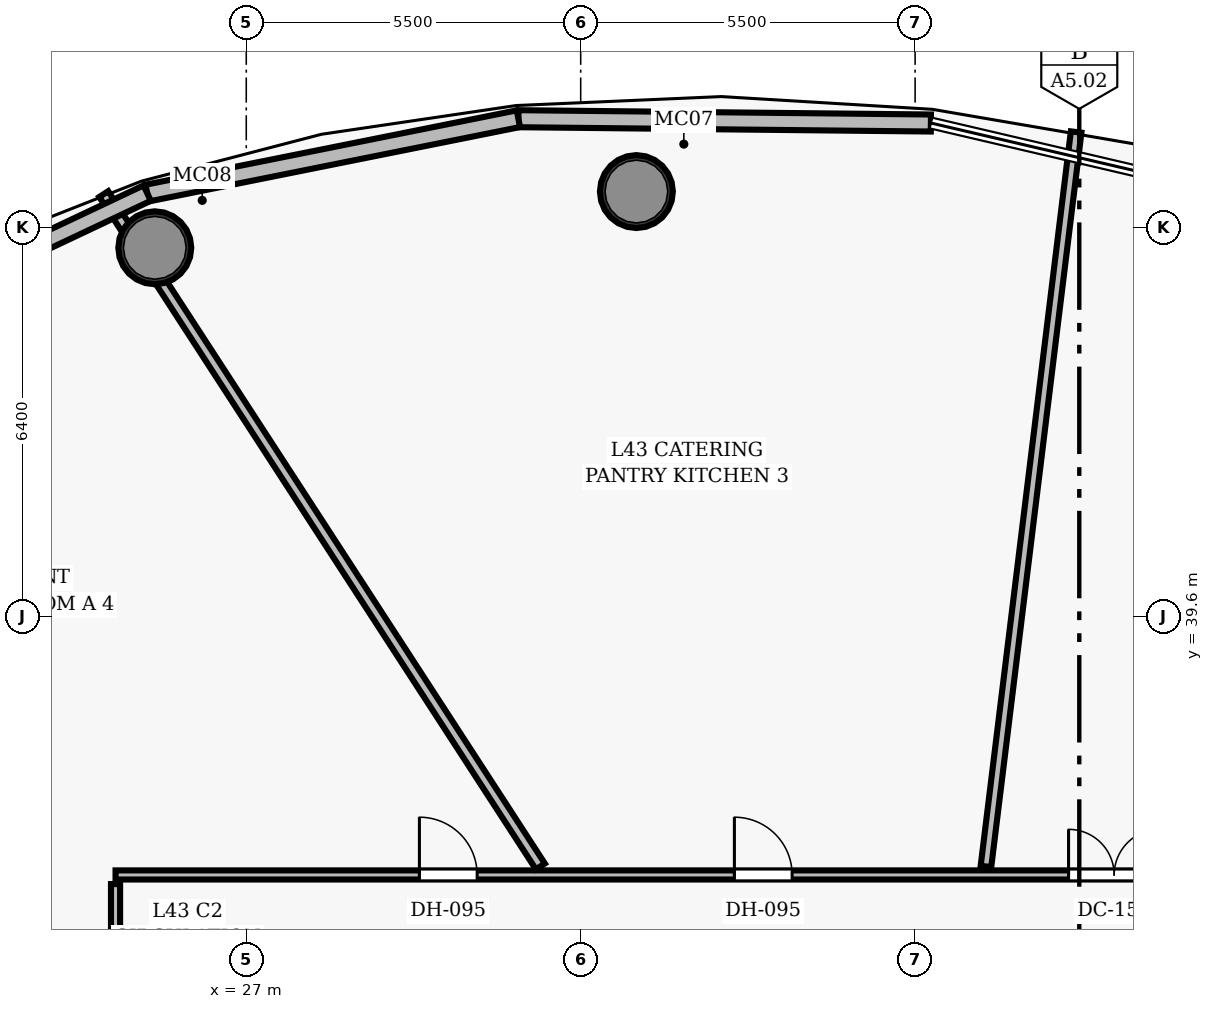
"""IFC4 building model, lengths in metres.
Left out: names, types, materials, properties, quantities, classifications, styles, units other than length and angle.
Written with IfcOpenShell. Run it as: python <this file> out.ifc"""

import sys

from ifc_helpers import new_model, si_unit, direction, frame, frame_2d, origin, origin_2d, place, context, subcontext, project, spatial, rectangle, hollow_circle, extrude, element, fill, save


model = new_model("IFC4")
c1 = context("Model", 3, precision=1e-05, world=origin(), true_north=direction((0.0, 1.0)))
c2 = subcontext(c1, "Body", "Model", "MODEL_VIEW")
j1 = project(units=[si_unit("LENGTHUNIT", "METRE"), si_unit("PLANEANGLEUNIT", "RADIAN")], contexts=[c1])
p1 = place(None, origin())
s1 = spatial("IfcSite", under=j1, at=p1, CompositionType="ELEMENT")
p2 = place(p1, origin())
s2 = spatial("IfcBuilding", under=s1, at=p2, CompositionType="ELEMENT")
p3 = place(p2, frame((0.0, 0.0, 171.2)))
s3 = spatial("IfcBuildingStorey", under=s2, at=p3, CompositionType="ELEMENT", Elevation=171.2)
for number, where, z_axis, x_axis in (
    (1, (33.416, 46.588, 0.0), (0.0, 0.0, 1.0), (1.0, 0.0, 0.0)),
    (2, (25.496, 45.664, 0.0), (0.0, 0.0, 1.0), (1.0, 0.0, 0.0)),
):
    element("IfcColumn", number, at=place(p3, frame(where, z_axis=z_axis, x_axis=x_axis)), inside=s3, PredefinedType="COLUMN", context=c2, shape_type="SweptSolid", body=[
        extrude(hollow_circle(Radius=0.6, WallThickness=0.05, at=origin_2d()), origin(), (0.0, 0.0, 1.0), 3.85),
    ])
p4 = place(p3, frame((24.85, 35.35, 0.0), z_axis=(0.0, 0.0, 1.0), x_axis=(1.0, 0.0, 0.0)))
e3 = element("IfcWall", 3, at=p4, inside=s3, PredefinedType="PARTITIONING", context=c2, shape_type="SweptSolid", body=[
    extrude(rectangle(XDim=26.0, YDim=0.15, at=frame_2d((13.0, 0.0))), origin(), (0.0, 0.0, 1.0), 3.035),
])
p5 = place(p4, frame((15.674, 0.0, 0.0)))
e4 = element("IfcOpeningElement", 4, at=p5, cuts=e3, PredefinedType="OPENING", context=c2, shape_type="SweptSolid", body=[
    extrude(rectangle(XDim=1.5, YDim=2.2, at=frame_2d((0.75, 1.1))), frame((0.0, 0.085, 0.0), z_axis=(0.0, -1.0, 0.0), x_axis=(1.0, 0.0, 0.0)), (0.0, 0.0, 1.0), 0.17),
])
p6 = place(p4, frame((10.178, 0.0, 0.0)))
e5 = element("IfcOpeningElement", 5, at=p6, cuts=e3, PredefinedType="OPENING", context=c2, shape_type="SweptSolid", body=[
    extrude(rectangle(XDim=0.95, YDim=2.15, at=frame_2d((0.475, 1.075))), frame((0.0, 0.085, 0.0), z_axis=(0.0, -1.0, 0.0), x_axis=(1.0, 0.0, 0.0)), (0.0, 0.0, 1.0), 0.17),
])
p7 = place(p4, frame((4.997, 0.0, 0.0)))
e6 = element("IfcOpeningElement", 6, at=p7, cuts=e3, PredefinedType="OPENING", context=c2, shape_type="SweptSolid", body=[
    extrude(rectangle(XDim=0.95, YDim=2.15, at=frame_2d((0.475, 1.075))), frame((0.0, 0.085, 0.0), z_axis=(0.0, -1.0, 0.0), x_axis=(1.0, 0.0, 0.0)), (0.0, 0.0, 1.0), 0.17),
])
p8 = place(p3, frame((24.85, 27.08, 0.0), z_axis=(0.0, 0.0, 1.0), x_axis=(0.0, 1.0, 0.0)))
e7 = element("IfcWall", 7, at=p8, inside=s3, PredefinedType="PARTITIONING", context=c2, shape_type="SweptSolid", body=[
    extrude(rectangle(XDim=8.12, YDim=0.15, at=frame_2d((4.06, 0.0))), origin(), (0.0, 0.0, 1.0), 3.035),
])
p9 = place(p3, frame((39.165, 35.49, 0.0), z_axis=(0.0, 0.0, 1.0), x_axis=(0.121866334527, 0.99254652108, 0.0)))
e8 = element("IfcWall", 8, at=p9, inside=s3, PredefinedType="PARTITIONING", context=c2, shape_type="SweptSolid", body=[
    extrude(rectangle(XDim=12.168, YDim=0.175, at=frame_2d((6.084, 0.0))), origin(), (0.0, 0.0, 1.0), 3.035),
])
p10 = place(p3, frame((31.837, 35.49, 0.0), z_axis=(0.0, 0.0, 1.0), x_axis=(-0.544634876215, 0.838673268687, 0.0)))
e9 = element("IfcWall", 9, at=p10, inside=s3, PredefinedType="PARTITIONING", context=c2, shape_type="SweptSolid", body=[
    extrude(rectangle(XDim=13.184, YDim=0.175, at=frame_2d((6.592, 0.0))), origin(), (0.0, 0.0, 1.0), 3.035),
])
p11 = place(p3, frame((31.475, 47.787, 0.0), z_axis=(0.0, 0.0, 1.0), x_axis=(0.999945547735, -0.010435591221, 0.0)))
e10 = element("IfcWall", 10, at=p11, inside=s3, PredefinedType="SOLIDWALL", context=c2, shape_type="SweptSolid", body=[
    extrude(rectangle(XDim=6.785, YDim=0.28, at=frame_2d((3.392, 0.0))), origin(), (0.0, 0.0, 1.0), 3.62),
])
p12 = place(p3, frame((25.37, 46.563, 0.0), z_axis=(0.0, 0.0, 1.0), x_axis=(0.980506708693, 0.196485608144, 0.0)))
e11 = element("IfcWall", 11, at=p12, inside=s3, PredefinedType="SOLIDWALL", context=c2, shape_type="SweptSolid", body=[
    extrude(rectangle(XDim=6.226, YDim=0.28, at=frame_2d((3.113, 0.0))), origin(), (0.0, 0.0, 1.0), 3.62),
])
p13 = place(p3, frame((20.43, 44.229, 0.0), z_axis=(0.0, 0.0, 1.0), x_axis=(0.904134088176, 0.427248815794, 0.0)))
e12 = element("IfcWall", 12, at=p13, inside=s3, PredefinedType="SOLIDWALL", context=c2, shape_type="SweptSolid", body=[
    extrude(rectangle(XDim=5.465, YDim=0.28, at=frame_2d((2.732, 0.0))), origin(), (0.0, 0.0, 1.0), 3.62),
])
p14 = place(p5, origin())
e13 = element("IfcDoor", 13, at=p14, inside=s3, OperationType="DOUBLE_DOOR_SINGLE_SWING", PredefinedType="DOOR", context=c2, shape_type="SweptSolid", body=[
    extrude(rectangle(XDim=1.5, YDim=2.2, at=frame_2d((0.75, 1.1))), frame((0.0, 0.025, 0.0), z_axis=(0.0, -1.0, 0.0), x_axis=(1.0, 0.0, 0.0)), (0.0, 0.0, 1.0), 0.05),
])
fill(e4, e13)
p15 = place(p6, origin())
e14 = element("IfcDoor", 14, at=p15, inside=s3, OperationType="SINGLE_SWING_LEFT", PredefinedType="DOOR", context=c2, shape_type="SweptSolid", body=[
    extrude(rectangle(XDim=0.95, YDim=2.15, at=frame_2d((0.475, 1.075))), frame((0.0, 0.025, 0.0), z_axis=(0.0, -1.0, 0.0), x_axis=(1.0, 0.0, 0.0)), (0.0, 0.0, 1.0), 0.05),
])
fill(e5, e14)
p16 = place(p7, origin())
e15 = element("IfcDoor", 15, at=p16, inside=s3, OperationType="SINGLE_SWING_LEFT", PredefinedType="DOOR", context=c2, shape_type="SweptSolid", body=[
    extrude(rectangle(XDim=0.95, YDim=2.15, at=frame_2d((0.475, 1.075))), frame((0.0, 0.025, 0.0), z_axis=(0.0, -1.0, 0.0), x_axis=(1.0, 0.0, 0.0)), (0.0, 0.0, 1.0), 0.05),
])
fill(e6, e15)
save(model, sys.argv[1])
